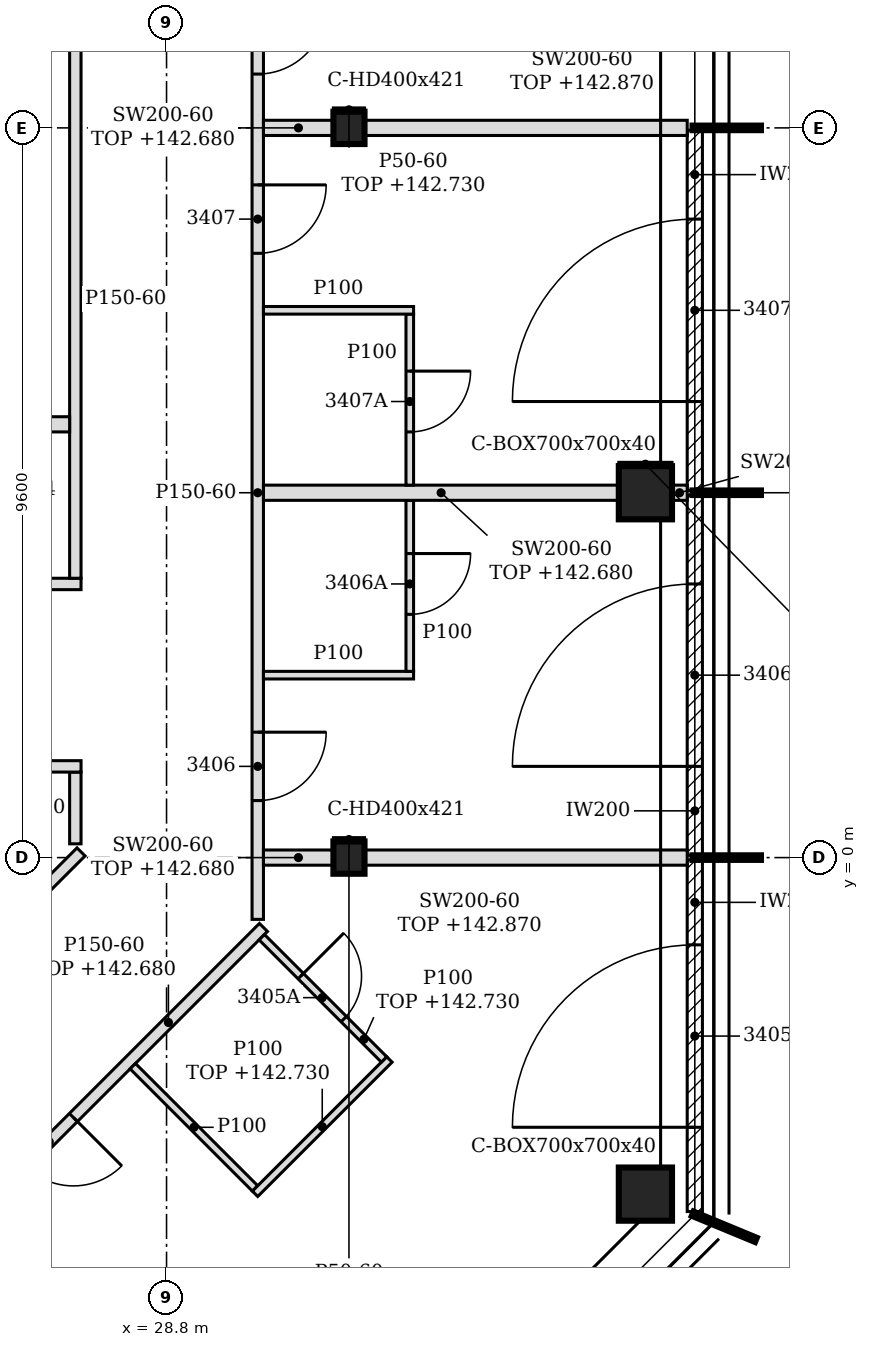
"""IFC4 building model, lengths in metres.
Left out: names, types, materials, properties, quantities, classifications, styles, units other than length and angle.
Written with IfcOpenShell. Run it as: python <this file> out.ifc"""

import sys

from ifc_helpers import new_model, si_unit, direction, frame, frame_2d, origin, origin_2d, place, context, subcontext, project, spatial, polyline, rectangle, hollow_rectangle, i_section, outline, extrude, element, fill, save


model = new_model("IFC4")
c1 = context("Model", 3, precision=1e-05, world=origin(), true_north=direction((0.0, 1.0)))
c2 = subcontext(c1, "Body", "Model", "MODEL_VIEW")
j1 = project(units=[si_unit("LENGTHUNIT", "METRE"), si_unit("PLANEANGLEUNIT", "RADIAN")], contexts=[c1])
p1 = place(None, origin())
s1 = spatial("IfcSite", under=j1, at=p1, CompositionType="ELEMENT")
p2 = place(p1, origin())
s2 = spatial("IfcBuilding", under=s1, at=p2, CompositionType="ELEMENT")
p3 = place(p2, frame((0.0, 0.0, 139.8)))
s3 = spatial("IfcBuildingStorey", under=s2, at=p3, CompositionType="ELEMENT", Elevation=139.8)
for number, where, z_axis, x_axis in (
    (1, (35.1, -4.427, -0.15), (0.0, 0.0, 1.0), (1.0, 0.0, 0.0)),
    (2, (35.1, 4.8, -0.15), (0.0, 0.0, 1.0), (1.0, 0.0, 0.0)),
):
    element("IfcColumn", number, at=place(p3, frame(where, z_axis=z_axis, x_axis=x_axis)), inside=s3, PredefinedType="COLUMN", context=c2, shape_type="SweptSolid", body=[
        extrude(hollow_rectangle(XDim=0.7, YDim=0.7, WallThickness=0.04, at=origin_2d()), origin(), (0.0, 0.0, 1.0), 3.6),
    ])
for number, where, z_axis, x_axis in (
    (3, (31.2, 0.0, -0.15), (0.0, 0.0, 1.0), (1.0, 0.0, 0.0)),
    (4, (31.2, 9.6, -0.15), (0.0, 0.0, 1.0), (1.0, 0.0, 0.0)),
):
    element("IfcColumn", number, at=place(p3, frame(where, z_axis=z_axis, x_axis=x_axis)), inside=s3, PredefinedType="COLUMN", context=c2, shape_type="SweptSolid", body=[
        extrude(i_section(OverallWidth=0.409, OverallDepth=0.425, WebThickness=0.033, FlangeThickness=0.052, FilletRadius=0.015, at=origin_2d()), origin(), (0.0, 0.0, 1.0), 3.6),
    ])
p4 = place(p3, frame((35.75, -4.656, 0.0), z_axis=(0.0, 0.0, 1.0), x_axis=(0.0, 1.0, 0.0)))
e5 = element("IfcWall", 5, at=p4, inside=s3, PredefinedType="NOTDEFINED", context=c2, shape_type="SweptSolid", body=[
    extrude(rectangle(XDim=4.626, YDim=0.2, at=frame_2d((2.313, 0.0))), origin(), (0.0, 0.0, 1.0), 3.45),
])
p5 = place(p4, frame((1.108, 0.0, 0.0)))
e6 = element("IfcOpeningElement", 6, at=p5, cuts=e5, PredefinedType="OPENING", context=c2, shape_type="SweptSolid", body=[
    extrude(rectangle(XDim=2.4, YDim=2.4, at=frame_2d((1.2, 1.2))), frame((0.0, 0.11, 0.0), z_axis=(0.0, -1.0, 0.0), x_axis=(1.0, 0.0, 0.0)), (0.0, 0.0, 1.0), 0.22),
])
p6 = place(p3, frame((35.75, 0.03, 0.0), z_axis=(0.0, 0.0, 1.0), x_axis=(0.0, 1.0, 0.0)))
e7 = element("IfcWall", 7, at=p6, inside=s3, PredefinedType="NOTDEFINED", context=c2, shape_type="SweptSolid", body=[
    extrude(rectangle(XDim=4.74, YDim=0.2, at=frame_2d((2.37, 0.0))), origin(), (0.0, 0.0, 1.0), 3.45),
])
p7 = place(p6, frame((1.17, 0.0, 0.0)))
e8 = element("IfcOpeningElement", 8, at=p7, cuts=e7, PredefinedType="OPENING", context=c2, shape_type="SweptSolid", body=[
    extrude(rectangle(XDim=2.4, YDim=2.4, at=frame_2d((1.2, 1.2))), frame((0.0, 0.11, 0.0), z_axis=(0.0, -1.0, 0.0), x_axis=(1.0, 0.0, 0.0)), (0.0, 0.0, 1.0), 0.22),
])
p8 = place(p3, frame((35.75, 4.83, 0.0), z_axis=(0.0, 0.0, 1.0), x_axis=(0.0, 1.0, 0.0)))
e9 = element("IfcWall", 9, at=p8, inside=s3, PredefinedType="NOTDEFINED", context=c2, shape_type="SweptSolid", body=[
    extrude(rectangle(XDim=4.74, YDim=0.2, at=frame_2d((2.37, 0.0))), origin(), (0.0, 0.0, 1.0), 3.45),
])
p9 = place(p8, frame((1.17, 0.0, 0.0)))
e10 = element("IfcOpeningElement", 10, at=p9, cuts=e9, PredefinedType="OPENING", context=c2, shape_type="SweptSolid", body=[
    extrude(rectangle(XDim=2.4, YDim=2.4, at=frame_2d((1.2, 1.2))), frame((0.0, 0.11, 0.0), z_axis=(0.0, -1.0, 0.0), x_axis=(1.0, 0.0, 0.0)), (0.0, 0.0, 1.0), 0.22),
])
p10 = place(p3, frame((30.125, -8.702, 0.0), z_axis=(0.0, 0.0, 1.0), x_axis=(-0.707084440093, 0.707129121574, 0.0)))
e11 = element("IfcWall", 11, at=p10, inside=s3, PredefinedType="PARTITIONING", context=c2, shape_type="SweptSolid", body=[
    extrude(rectangle(XDim=5.464, YDim=0.2, at=frame_2d((2.732, 0.0))), origin(), (0.0, 0.0, 1.0), 2.88),
])
p11 = place(p3, frame((22.722, -8.272, 0.0), z_axis=(0.0, 0.0, 1.0), x_axis=(0.707106781187, 0.707106781187, 0.0)))
e12 = element("IfcWall", 12, at=p11, inside=s3, PredefinedType="PARTITIONING", context=c2, shape_type="SweptSolid", body=[
    extrude(rectangle(XDim=10.399, YDim=0.15, at=frame_2d((5.199, 0.0))), origin(), (0.0, 0.0, 1.0), 2.88),
])
p12 = place(p11, frame((1.925, 0.0, 0.0)))
e13 = element("IfcOpeningElement", 13, at=p12, cuts=e12, PredefinedType="OPENING", context=c2, shape_type="SweptSolid", body=[
    extrude(rectangle(XDim=0.9, YDim=2.1, at=frame_2d((0.45, 1.05))), frame((0.0, 0.085, 0.0), z_axis=(0.0, -1.0, 0.0), x_axis=(1.0, 0.0, 0.0)), (0.0, 0.0, 1.0), 0.17),
])
p13 = place(p11, frame((5.963, 0.0, 0.0)))
e14 = element("IfcOpeningElement", 14, at=p13, cuts=e12, PredefinedType="OPENING", context=c2, shape_type="SweptSolid", body=[
    extrude(rectangle(XDim=0.9, YDim=2.1, at=frame_2d((0.45, 1.05))), frame((0.0, 0.085, 0.0), z_axis=(0.0, -1.0, 0.0), x_axis=(1.0, 0.0, 0.0)), (0.0, 0.0, 1.0), 0.17),
])
p14 = place(p3, frame((19.408, -8.191, 0.0), z_axis=(0.0, 0.0, 1.0), x_axis=(0.707117222888, 0.707096339331, 0.0)))
e15 = element("IfcWall", 15, at=p14, inside=s3, PredefinedType="PARTITIONING", context=c2, shape_type="SweptSolid", body=[
    extrude(rectangle(XDim=11.691, YDim=0.15, at=frame_2d((5.845, 0.0))), origin(), (0.0, 0.0, 1.0), 2.88),
])
p15 = place(p14, frame((5.195, 0.0, 0.0)))
e16 = element("IfcOpeningElement", 16, at=p15, cuts=e15, PredefinedType="OPENING", context=c2, shape_type="SweptSolid", body=[
    extrude(rectangle(XDim=0.9, YDim=2.1, at=frame_2d((0.45, 1.05))), frame((0.0, 0.085, 0.0), z_axis=(0.0, -1.0, 0.0), x_axis=(1.0, 0.0, 0.0)), (0.0, 0.0, 1.0), 0.17),
])
p16 = place(p3, frame((29.965, -4.353, 0.0), z_axis=(0.0, 0.0, 1.0), x_axis=(-0.707106781187, 0.707106781187, 0.0)))
e17 = element("IfcWall", 17, at=p16, inside=s3, PredefinedType="PARTITIONING", context=c2, shape_type="SweptSolid", body=[
    extrude(rectangle(XDim=2.275, YDim=0.1, at=frame_2d((1.137, 0.0))), origin(), (0.0, 0.0, 1.0), 3.45),
])
p17 = place(p3, frame((29.965, -4.423, 0.0), z_axis=(0.0, 0.0, 1.0), x_axis=(0.707155609469, 0.707057949532, 0.0)))
e18 = element("IfcWall", 18, at=p17, inside=s3, PredefinedType="PARTITIONING", context=c2, shape_type="SweptSolid", body=[
    extrude(rectangle(XDim=2.5, YDim=0.1, at=frame_2d((1.25, 0.0))), origin(), (0.0, 0.0, 1.0), 2.93),
])
p18 = place(p3, frame((31.662, -2.656, 0.0), z_axis=(0.0, 0.0, 1.0), x_axis=(-0.707160441348, 0.707053116953, 0.0)))
e19 = element("IfcWall", 19, at=p18, inside=s3, PredefinedType="PARTITIONING", context=c2, shape_type="SweptSolid", body=[
    extrude(rectangle(XDim=2.275, YDim=0.1, at=frame_2d((1.137, 0.0))), origin(), (0.0, 0.0, 1.0), 2.93),
])
p19 = place(p18, frame((0.75, 0.0, 0.0)))
e20 = element("IfcOpeningElement", 20, at=p19, cuts=e19, PredefinedType="OPENING", context=c2, shape_type="SweptSolid", body=[
    extrude(rectangle(XDim=0.8, YDim=2.1, at=frame_2d((0.4, 1.05))), frame((0.0, 0.06, 0.0), z_axis=(0.0, -1.0, 0.0), x_axis=(1.0, 0.0, 0.0)), (0.0, 0.0, 1.0), 0.12),
])
p20 = place(p3, frame((30.0, -0.813, 0.0), z_axis=(0.0, 0.0, 1.0), x_axis=(0.0, 1.0, 0.0)))
e21 = element("IfcWall", 21, at=p20, inside=s3, PredefinedType="PARTITIONING", context=c2, shape_type="SweptSolid", body=[
    extrude(outline(polyline([(0.0, 0.0), (12.834, 0.0), (12.834, 3.45), (10.518, 3.45), (10.516, 2.88), (10.308, 2.88), (10.306, 3.45), (5.718, 3.45), (5.716, 2.88), (5.508, 2.88), (5.506, 3.45), (0.918, 3.45), (0.916, 2.88), (0.708, 2.88), (0.706, 3.45), (0.0, 3.45), (0.0, 0.0)])), frame((0.0, 0.075, 0.0), z_axis=(0.0, -1.0, 0.0), x_axis=(1.0, 0.0, 0.0)), (0.0, 0.0, 1.0), 0.15),
])
p21 = place(p20, frame((1.563, 0.0, 0.0)))
e22 = element("IfcOpeningElement", 22, at=p21, cuts=e21, PredefinedType="OPENING", context=c2, shape_type="SweptSolid", body=[
    extrude(rectangle(XDim=0.9, YDim=2.1, at=frame_2d((0.45, 1.05))), frame((0.0, 0.085, 0.0), z_axis=(0.0, -1.0, 0.0), x_axis=(1.0, 0.0, 0.0)), (0.0, 0.0, 1.0), 0.17),
])
p22 = place(p20, frame((8.763, 0.0, 0.0)))
e23 = element("IfcOpeningElement", 23, at=p22, cuts=e21, PredefinedType="OPENING", context=c2, shape_type="SweptSolid", body=[
    extrude(rectangle(XDim=0.9, YDim=2.1, at=frame_2d((0.45, 1.05))), frame((0.0, 0.085, 0.0), z_axis=(0.0, -1.0, 0.0), x_axis=(1.0, 0.0, 0.0)), (0.0, 0.0, 1.0), 0.17),
])
p23 = place(p20, frame((11.121, 0.0, 0.0)))
e24 = element("IfcOpeningElement", 24, at=p23, cuts=e21, PredefinedType="OPENING", context=c2, shape_type="SweptSolid", body=[
    extrude(rectangle(XDim=0.9, YDim=2.1, at=frame_2d((0.45, 1.05))), frame((0.0, 0.085, 0.0), z_axis=(0.0, -1.0, 0.0), x_axis=(1.0, 0.0, 0.0)), (0.0, 0.0, 1.0), 0.17),
])
p24 = place(p3, frame((30.075, 0.0, 0.0), z_axis=(0.0, 0.0, 1.0), x_axis=(1.0, 0.0, 0.0)))
e25 = element("IfcWall", 25, at=p24, inside=s3, PredefinedType="PARTITIONING", context=c2, shape_type="SweptSolid", body=[
    extrude(rectangle(XDim=0.921, YDim=0.2, at=frame_2d((0.46, 0.0))), origin(), (0.0, 0.0, 1.0), 2.88),
])
p25 = place(p3, frame((31.405, 0.0, 0.0), z_axis=(0.0, 0.0, 1.0), x_axis=(1.0, 0.0, 0.0)))
e26 = element("IfcWall", 26, at=p25, inside=s3, PredefinedType="PARTITIONING", context=c2, shape_type="SweptSolid", body=[
    extrude(outline(polyline([(0.0, 0.0), (4.245, 0.0), (4.246, 3.07), (3.845, 3.07), (3.844, 2.93), (3.545, 2.93), (3.543, 3.07), (0.0, 3.07), (0.0, 0.0)])), frame((0.0, 0.1, 0.0), z_axis=(0.0, -1.0, 0.0), x_axis=(1.0, 0.0, 0.0)), (0.0, 0.0, 1.0), 0.2),
])
p26 = place(p3, frame((27.6, 0.181, 0.0), z_axis=(0.0, 0.0, 1.0), x_axis=(0.0, 1.0, 0.0)))
e27 = element("IfcWall", 27, at=p26, inside=s3, PredefinedType="PARTITIONING", context=c2, shape_type="SweptSolid", body=[
    extrude(rectangle(XDim=0.944, YDim=0.15, at=frame_2d((0.472, 0.0))), origin(), (0.0, 0.0, 1.0), 3.45),
])
p27 = place(p3, frame((19.125, 1.2, 0.0), z_axis=(0.0, 0.0, 1.0), x_axis=(1.0, 0.0, 0.0)))
e28 = element("IfcWall", 28, at=p27, inside=s3, PredefinedType="PARTITIONING", context=c2, shape_type="SweptSolid", body=[
    extrude(outline(polyline([(0.0, 0.0), (8.55, 0.0), (8.55, 3.45), (0.225, 3.45), (0.223, 2.83), (0.0, 2.83), (0.0, 0.0)])), frame((0.0, 0.075, 0.0), z_axis=(0.0, -1.0, 0.0), x_axis=(1.0, 0.0, 0.0)), (0.0, 0.0, 1.0), 0.15),
])
p28 = place(p3, frame((30.075, 2.4, 0.0), z_axis=(0.0, 0.0, 1.0), x_axis=(1.0, 0.0, 0.0)))
e29 = element("IfcWall", 29, at=p28, inside=s3, PredefinedType="PARTITIONING", context=c2, shape_type="SweptSolid", body=[
    extrude(outline(polyline([(0.0, 0.0), (1.975, 0.0), (1.975, 3.45), (1.275, 3.45), (1.273, 2.93), (0.975, 2.93), (0.973, 3.45), (0.0, 3.45), (0.0, 0.0)])), frame((0.0, 0.05, 0.0), z_axis=(0.0, -1.0, 0.0), x_axis=(1.0, 0.0, 0.0)), (0.0, 0.0, 1.0), 0.1),
])
p29 = place(p3, frame((32.0, 2.45, 0.0), z_axis=(0.0, 0.0, 1.0), x_axis=(0.0, 1.0, 0.0)))
e30 = element("IfcWall", 30, at=p29, inside=s3, PredefinedType="PARTITIONING", context=c2, shape_type="SweptSolid", body=[
    extrude(rectangle(XDim=2.25, YDim=0.1, at=frame_2d((1.125, 0.0))), origin(), (0.0, 0.0, 1.0), 3.45),
])
p30 = place(p29, frame((0.75, 0.0, 0.0)))
e31 = element("IfcOpeningElement", 31, at=p30, cuts=e30, PredefinedType="OPENING", context=c2, shape_type="SweptSolid", body=[
    extrude(rectangle(XDim=0.8, YDim=2.1, at=frame_2d((0.4, 1.05))), frame((0.0, 0.06, 0.0), z_axis=(0.0, -1.0, 0.0), x_axis=(1.0, 0.0, 0.0)), (0.0, 0.0, 1.0), 0.12),
])
p31 = place(p3, frame((19.125, 3.6, 0.0), z_axis=(0.0, 0.0, 1.0), x_axis=(1.0, 0.0, 0.0)))
e32 = element("IfcWall", 32, at=p31, inside=s3, PredefinedType="PARTITIONING", context=c2, shape_type="SweptSolid", body=[
    extrude(outline(polyline([(0.0, 0.0), (8.55, 0.0), (8.55, 3.45), (0.225, 3.45), (0.223, 2.83), (0.0, 2.83), (0.0, 0.0)])), frame((0.0, 0.075, 0.0), z_axis=(0.0, -1.0, 0.0), x_axis=(1.0, 0.0, 0.0)), (0.0, 0.0, 1.0), 0.15),
])
p32 = place(p31, frame((6.425, 0.0, 0.0)))
e33 = element("IfcOpeningElement", 33, at=p32, cuts=e32, PredefinedType="OPENING", context=c2, shape_type="SweptSolid", body=[
    extrude(rectangle(XDim=0.8, YDim=2.1, at=frame_2d((0.4, 1.05))), frame((0.0, 0.085, 0.0), z_axis=(0.0, -1.0, 0.0), x_axis=(1.0, 0.0, 0.0)), (0.0, 0.0, 1.0), 0.17),
])
p33 = place(p3, frame((27.6, 3.675, 0.0), z_axis=(0.0, 0.0, 1.0), x_axis=(0.0, 1.0, 0.0)))
e34 = element("IfcWall", 34, at=p33, inside=s3, PredefinedType="PARTITIONING", context=c2, shape_type="SweptSolid", body=[
    extrude(outline(polyline([(0.0, 0.0), (7.352, 0.0), (7.352, 3.45), (6.03, 3.45), (6.028, 2.88), (5.82, 2.88), (5.818, 3.45), (1.23, 3.45), (1.228, 2.88), (1.02, 2.88), (1.018, 3.45), (0.0, 3.45), (0.0, 0.0)])), frame((0.0, 0.075, 0.0), z_axis=(0.0, -1.0, 0.0), x_axis=(1.0, 0.0, 0.0)), (0.0, 0.0, 1.0), 0.15),
])
p34 = place(p3, frame((30.075, 4.8, 0.0), z_axis=(0.0, 0.0, 1.0), x_axis=(1.0, 0.0, 0.0)))
e35 = element("IfcWall", 35, at=p34, inside=s3, PredefinedType="PARTITIONING", context=c2, shape_type="SweptSolid", body=[
    extrude(rectangle(XDim=4.675, YDim=0.2, at=frame_2d((2.337, 0.0))), origin(), (0.0, 0.0, 1.0), 2.88),
])
p35 = place(p3, frame((35.45, 4.8, 0.0), z_axis=(0.0, 0.0, 1.0), x_axis=(1.0, 0.0, 0.0)))
e36 = element("IfcWall", 36, at=p35, inside=s3, PredefinedType="PARTITIONING", context=c2, shape_type="SweptSolid", body=[
    extrude(rectangle(XDim=0.2, YDim=0.2, at=frame_2d((0.1, 0.0))), origin(), (0.0, 0.0, 1.0), 3.45),
])
p36 = place(p3, frame((32.0, 4.9, 0.0), z_axis=(0.0, 0.0, 1.0), x_axis=(0.0, 1.0, 0.0)))
e37 = element("IfcWall", 37, at=p36, inside=s3, PredefinedType="PARTITIONING", context=c2, shape_type="SweptSolid", body=[
    extrude(rectangle(XDim=2.25, YDim=0.1, at=frame_2d((1.125, 0.0))), origin(), (0.0, 0.0, 1.0), 3.45),
])
p37 = place(p36, frame((0.7, 0.0, 0.0)))
e38 = element("IfcOpeningElement", 38, at=p37, cuts=e37, PredefinedType="OPENING", context=c2, shape_type="SweptSolid", body=[
    extrude(rectangle(XDim=0.8, YDim=2.1, at=frame_2d((0.4, 1.05))), frame((0.0, 0.06, 0.0), z_axis=(0.0, -1.0, 0.0), x_axis=(1.0, 0.0, 0.0)), (0.0, 0.0, 1.0), 0.12),
])
p38 = place(p3, frame((24.2, 5.7, 0.0), z_axis=(0.0, 0.0, 1.0), x_axis=(1.0, 0.0, 0.0)))
e39 = element("IfcWall", 39, at=p38, inside=s3, PredefinedType="PARTITIONING", context=c2, shape_type="SweptSolid", body=[
    extrude(rectangle(XDim=3.325, YDim=0.2, at=frame_2d((1.663, 0.0))), origin(), (0.0, 0.0, 1.0), 3.45),
])
p39 = place(p3, frame((30.075, 7.2, 0.0), z_axis=(0.0, 0.0, 1.0), x_axis=(1.0, 0.0, 0.0)))
e40 = element("IfcWall", 40, at=p39, inside=s3, PredefinedType="PARTITIONING", context=c2, shape_type="SweptSolid", body=[
    extrude(outline(polyline([(0.0, 0.0), (1.975, 0.0), (1.975, 3.45), (1.275, 3.45), (1.273, 2.93), (0.975, 2.93), (0.973, 3.45), (0.0, 3.45), (0.0, 0.0)])), frame((0.0, 0.05, 0.0), z_axis=(0.0, -1.0, 0.0), x_axis=(1.0, 0.0, 0.0)), (0.0, 0.0, 1.0), 0.1),
])
p40 = place(p3, frame((30.075, 9.6, 0.0), z_axis=(0.0, 0.0, 1.0), x_axis=(1.0, 0.0, 0.0)))
e41 = element("IfcWall", 41, at=p40, inside=s3, PredefinedType="PARTITIONING", context=c2, shape_type="SweptSolid", body=[
    extrude(rectangle(XDim=0.921, YDim=0.2, at=frame_2d((0.46, 0.0))), origin(), (0.0, 0.0, 1.0), 2.88),
])
p41 = place(p3, frame((31.405, 9.6, 0.0), z_axis=(0.0, 0.0, 1.0), x_axis=(1.0, 0.0, 0.0)))
e42 = element("IfcWall", 42, at=p41, inside=s3, PredefinedType="PARTITIONING", context=c2, shape_type="SweptSolid", body=[
    extrude(outline(polyline([(0.0, 0.0), (4.245, 0.0), (4.246, 3.07), (3.845, 3.07), (3.844, 2.93), (3.545, 2.93), (3.543, 3.07), (0.0, 3.07), (0.0, 0.0)])), frame((0.0, 0.1, 0.0), z_axis=(0.0, -1.0, 0.0), x_axis=(1.0, 0.0, 0.0)), (0.0, 0.0, 1.0), 0.2),
])
p42 = place(p3, frame((30.996, 0.238, 0.0), z_axis=(0.0, 0.0, 1.0), x_axis=(1.0, 0.0, 0.0)))
e43 = element("IfcWall", 43, at=p42, inside=s3, PredefinedType="PARTITIONING", context=c2, shape_type="SweptSolid", body=[
    extrude(rectangle(XDim=0.409, YDim=0.05, at=frame_2d((0.205, 0.0))), origin(), (0.0, 0.0, 1.0), 2.93),
])
p43 = place(p3, frame((34.75, 5.175, 0.0), z_axis=(0.0, 0.0, 1.0), x_axis=(1.0, 0.0, 0.0)))
e44 = element("IfcWall", 44, at=p43, inside=s3, PredefinedType="PARTITIONING", context=c2, shape_type="SweptSolid", body=[
    extrude(rectangle(XDim=0.7, YDim=0.05, at=frame_2d((0.35, 0.0))), origin(), (0.0, 0.0, 1.0), 2.93),
])
p44 = place(p3, frame((30.996, 9.837, 0.0), z_axis=(0.0, 0.0, 1.0), x_axis=(1.0, 0.0, 0.0)))
e45 = element("IfcWall", 45, at=p44, inside=s3, PredefinedType="PARTITIONING", context=c2, shape_type="SweptSolid", body=[
    extrude(rectangle(XDim=0.409, YDim=0.05, at=frame_2d((0.205, 0.0))), origin(), (0.0, 0.0, 1.0), 2.93),
])
p45 = place(p5, origin())
e46 = element("IfcDoor", 46, at=p45, inside=s3, OperationType="SINGLE_SWING_LEFT", PredefinedType="DOOR", context=c2, shape_type="SweptSolid", body=[
    extrude(rectangle(XDim=2.4, YDim=2.4, at=frame_2d((1.2, 1.2))), frame((0.0, 0.025, 0.0), z_axis=(0.0, -1.0, 0.0), x_axis=(1.0, 0.0, 0.0)), (0.0, 0.0, 1.0), 0.05),
])
fill(e6, e46)
p46 = place(p7, origin())
e47 = element("IfcDoor", 47, at=p46, inside=s3, OperationType="SINGLE_SWING_LEFT", PredefinedType="DOOR", context=c2, shape_type="SweptSolid", body=[
    extrude(rectangle(XDim=2.4, YDim=2.4, at=frame_2d((1.2, 1.2))), frame((0.0, 0.025, 0.0), z_axis=(0.0, -1.0, 0.0), x_axis=(1.0, 0.0, 0.0)), (0.0, 0.0, 1.0), 0.05),
])
fill(e8, e47)
p47 = place(p9, origin())
e48 = element("IfcDoor", 48, at=p47, inside=s3, OperationType="SINGLE_SWING_LEFT", PredefinedType="DOOR", context=c2, shape_type="SweptSolid", body=[
    extrude(rectangle(XDim=2.4, YDim=2.4, at=frame_2d((1.2, 1.2))), frame((0.0, 0.025, 0.0), z_axis=(0.0, -1.0, 0.0), x_axis=(1.0, 0.0, 0.0)), (0.0, 0.0, 1.0), 0.05),
])
fill(e10, e48)
p48 = place(p13, frame((0.9, 0.0, 0.0), z_axis=(0.0, 0.0, 1.0), x_axis=(-1.0, 0.0, 0.0)))
e49 = element("IfcDoor", 49, at=p48, inside=s3, OperationType="SINGLE_SWING_LEFT", PredefinedType="DOOR", context=c2, shape_type="SweptSolid", body=[
    extrude(rectangle(XDim=0.9, YDim=2.1, at=frame_2d((0.45, 1.05))), frame((0.0, 0.025, 0.0), z_axis=(0.0, -1.0, 0.0), x_axis=(1.0, 0.0, 0.0)), (0.0, 0.0, 1.0), 0.05),
])
fill(e14, e49)
p49 = place(p19, frame((0.8, 0.0, 0.0), z_axis=(0.0, 0.0, 1.0), x_axis=(-1.0, 0.0, 0.0)))
e50 = element("IfcDoor", 50, at=p49, inside=s3, OperationType="SINGLE_SWING_LEFT", PredefinedType="DOOR", context=c2, shape_type="SweptSolid", body=[
    extrude(rectangle(XDim=0.8, YDim=2.1, at=frame_2d((0.4, 1.05))), frame((0.0, 0.025, 0.0), z_axis=(0.0, -1.0, 0.0), x_axis=(1.0, 0.0, 0.0)), (0.0, 0.0, 1.0), 0.05),
])
fill(e20, e50)
p50 = place(p21, frame((0.9, 0.0, 0.0), z_axis=(0.0, 0.0, 1.0), x_axis=(-1.0, 0.0, 0.0)))
e51 = element("IfcDoor", 51, at=p50, inside=s3, OperationType="SINGLE_SWING_LEFT", PredefinedType="DOOR", context=c2, shape_type="SweptSolid", body=[
    extrude(rectangle(XDim=0.9, YDim=2.1, at=frame_2d((0.45, 1.05))), frame((0.0, 0.025, 0.0), z_axis=(0.0, -1.0, 0.0), x_axis=(1.0, 0.0, 0.0)), (0.0, 0.0, 1.0), 0.05),
])
fill(e22, e51)
p51 = place(p30, frame((0.8, 0.0, 0.0), z_axis=(0.0, 0.0, 1.0), x_axis=(-1.0, 0.0, 0.0)))
e52 = element("IfcDoor", 52, at=p51, inside=s3, OperationType="SINGLE_SWING_LEFT", PredefinedType="DOOR", context=c2, shape_type="SweptSolid", body=[
    extrude(rectangle(XDim=0.8, YDim=2.1, at=frame_2d((0.4, 1.05))), frame((0.0, 0.025, 0.0), z_axis=(0.0, -1.0, 0.0), x_axis=(1.0, 0.0, 0.0)), (0.0, 0.0, 1.0), 0.05),
])
fill(e31, e52)
p52 = place(p22, frame((0.9, 0.0, 0.0), z_axis=(0.0, 0.0, 1.0), x_axis=(-1.0, 0.0, 0.0)))
e53 = element("IfcDoor", 53, at=p52, inside=s3, OperationType="SINGLE_SWING_LEFT", PredefinedType="DOOR", context=c2, shape_type="SweptSolid", body=[
    extrude(rectangle(XDim=0.9, YDim=2.1, at=frame_2d((0.45, 1.05))), frame((0.0, 0.025, 0.0), z_axis=(0.0, -1.0, 0.0), x_axis=(1.0, 0.0, 0.0)), (0.0, 0.0, 1.0), 0.05),
])
fill(e23, e53)
p53 = place(p37, frame((0.8, 0.0, 0.0), z_axis=(0.0, 0.0, 1.0), x_axis=(-1.0, 0.0, 0.0)))
e54 = element("IfcDoor", 54, at=p53, inside=s3, OperationType="SINGLE_SWING_LEFT", PredefinedType="DOOR", context=c2, shape_type="SweptSolid", body=[
    extrude(rectangle(XDim=0.8, YDim=2.1, at=frame_2d((0.4, 1.05))), frame((0.0, 0.025, 0.0), z_axis=(0.0, -1.0, 0.0), x_axis=(1.0, 0.0, 0.0)), (0.0, 0.0, 1.0), 0.05),
])
fill(e38, e54)
p54 = place(p23, frame((0.9, 0.0, 0.0), z_axis=(0.0, 0.0, 1.0), x_axis=(-1.0, 0.0, 0.0)))
e55 = element("IfcDoor", 55, at=p54, inside=s3, OperationType="SINGLE_SWING_LEFT", PredefinedType="DOOR", context=c2, shape_type="SweptSolid", body=[
    extrude(rectangle(XDim=0.9, YDim=2.1, at=frame_2d((0.45, 1.05))), frame((0.0, 0.025, 0.0), z_axis=(0.0, -1.0, 0.0), x_axis=(1.0, 0.0, 0.0)), (0.0, 0.0, 1.0), 0.05),
])
fill(e24, e55)
save(model, sys.argv[1])
